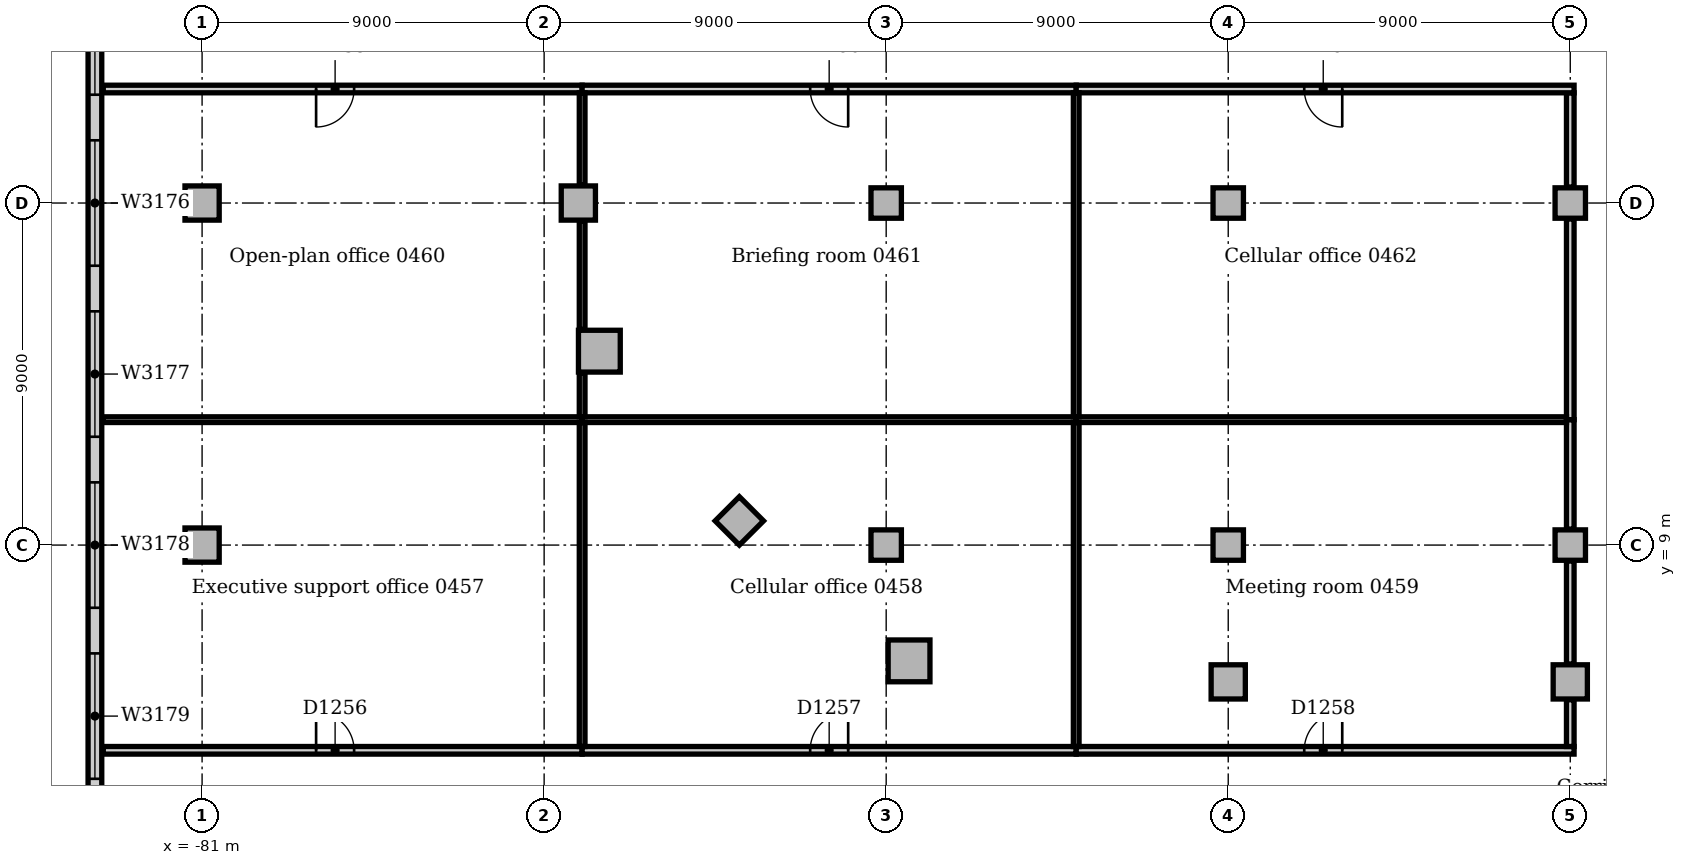
"""IFC4 building model, lengths in metres.
Left out: names, types, materials, properties, quantities, classifications, styles, units other than length and angle.
Written with IfcOpenShell. Run it as: python <this file> out.ifc"""

import sys

from ifc_helpers import new_model, si_unit, direction, frame, frame_2d, origin, origin_2d, place, context, subcontext, project, spatial, rectangle, extrude, element, fill, save


model = new_model("IFC4")
c1 = context("Model", 3, precision=1e-05, world=origin(), true_north=direction((0.0, 1.0)))
c2 = subcontext(c1, "Body", "Model", "MODEL_VIEW")
j1 = project(units=[si_unit("LENGTHUNIT", "METRE"), si_unit("PLANEANGLEUNIT", "RADIAN")], contexts=[c1])
p1 = place(None, origin())
s1 = spatial("IfcSite", under=j1, at=p1, CompositionType="ELEMENT")
p2 = place(p1, origin())
s2 = spatial("IfcBuilding", under=s1, at=p2, CompositionType="ELEMENT")
p3 = place(p2, frame((0.0, 0.0, 21.0)))
s3 = spatial("IfcBuildingStorey", under=s2, at=p3, CompositionType="ELEMENT", Elevation=21.0)
for number, where, z_axis, x_axis in (
    (1, (-62.398, 5.953, 0.0), (0.0, 0.0, 1.0), (1.0, 0.0, 0.0)),
    (2, (-70.547, 14.102, 0.0), (0.0, 0.0, 1.0), (1.0, 0.0, 0.0)),
):
    element("IfcColumn", number, at=place(p3, frame(where, z_axis=z_axis, x_axis=x_axis)), inside=s3, PredefinedType="COLUMN", context=c2, shape_type="SweptSolid", body=[
        extrude(rectangle(XDim=1.1, YDim=1.1, at=origin_2d()), origin(), (0.0, 0.0, 1.0), 4.85),
    ])
for number, where, z_axis, x_axis in (
    (3, (-54.0, 5.4, 0.0), (0.0, 0.0, 1.0), (1.0, 0.0, 0.0)),
    (4, (-45.0, 5.4, 0.0), (0.0, 0.0, 1.0), (1.0, 0.0, 0.0)),
    (5, (-71.1, 18.0, 0.0), (0.0, 0.0, 1.0), (1.0, 0.0, 0.0)),
    (6, (-66.864, 9.636, 0.0), (0.0, 0.0, 1.0), (0.707, 0.707, 0.0)),
):
    element("IfcColumn", number, at=place(p3, frame(where, z_axis=z_axis, x_axis=x_axis)), inside=s3, PredefinedType="COLUMN", context=c2, shape_type="SweptSolid", body=[
        extrude(rectangle(XDim=0.9, YDim=0.9, at=origin_2d()), origin(), (0.0, 0.0, 1.0), 4.85),
    ])
for number, where, z_axis, x_axis in (
    (7, (-63.0, 9.0, 0.0), (0.0, 0.0, 1.0), (1.0, 0.0, 0.0)),
    (8, (-63.0, 18.0, 0.0), (0.0, 0.0, 1.0), (1.0, 0.0, 0.0)),
    (9, (-54.0, 9.0, 0.0), (0.0, 0.0, 1.0), (1.0, 0.0, 0.0)),
    (10, (-54.0, 18.0, 0.0), (0.0, 0.0, 1.0), (1.0, 0.0, 0.0)),
    (11, (-45.0, 9.0, 0.0), (0.0, 0.0, 1.0), (1.0, 0.0, 0.0)),
    (12, (-45.0, 18.0, 0.0), (0.0, 0.0, 1.0), (1.0, 0.0, 0.0)),
):
    element("IfcColumn", number, at=place(p3, frame(where, z_axis=z_axis, x_axis=x_axis)), inside=s3, PredefinedType="COLUMN", context=c2, shape_type="SweptSolid", body=[
        extrude(rectangle(XDim=0.8, YDim=0.8, at=origin_2d()), origin(), (0.0, 0.0, 1.0), 4.85),
    ])
for number, where, z_axis, x_axis in (
    (13, (-81.0, 9.0, 0.0), (0.0, 0.0, 1.0), (1.0, 0.0, 0.0)),
    (14, (-81.0, 18.0, 0.0), (0.0, 0.0, 1.0), (1.0, 0.0, 0.0)),
):
    element("IfcColumn", number, at=place(p3, frame(where, z_axis=z_axis, x_axis=x_axis)), inside=s3, PredefinedType="COLUMN", context=c2, shape_type="SweptSolid", body=[
        extrude(rectangle(XDim=0.9, YDim=0.9, at=origin_2d()), origin(), (0.0, 0.0, 1.0), 4.7),
    ])
p4 = place(p3, frame((-83.82, 54.0, 0.0), z_axis=(0.0, 0.0, 1.0), x_axis=(0.0, -1.0, 0.0)))
e15 = element("IfcWall", 15, at=p4, inside=s3, PredefinedType="STANDARD", context=c2, shape_type="SweptSolid", body=[
    extrude(rectangle(XDim=63.0, YDim=0.36, at=frame_2d((31.5, 0.0))), origin(), (0.0, 0.0, 1.0), 4.85),
])
p5 = place(p4, frame((2.85, 0.0, 0.9)))
e16 = element("IfcOpeningElement", 16, at=p5, cuts=e15, PredefinedType="OPENING", context=c2, shape_type="SweptSolid", body=[
    extrude(rectangle(XDim=3.3, YDim=2.4, at=frame_2d((1.65, 1.2))), frame((0.0, 0.19, 0.0), z_axis=(0.0, -1.0, 0.0), x_axis=(1.0, 0.0, 0.0)), (0.0, 0.0, 1.0), 0.38),
])
p6 = place(p4, frame((7.35, 0.0, 0.9)))
e17 = element("IfcOpeningElement", 17, at=p6, cuts=e15, PredefinedType="OPENING", context=c2, shape_type="SweptSolid", body=[
    extrude(rectangle(XDim=3.3, YDim=2.4, at=frame_2d((1.65, 1.2))), frame((0.0, 0.19, 0.0), z_axis=(0.0, -1.0, 0.0), x_axis=(1.0, 0.0, 0.0)), (0.0, 0.0, 1.0), 0.38),
])
p7 = place(p4, frame((11.85, 0.0, 0.9)))
e18 = element("IfcOpeningElement", 18, at=p7, cuts=e15, PredefinedType="OPENING", context=c2, shape_type="SweptSolid", body=[
    extrude(rectangle(XDim=3.3, YDim=2.4, at=frame_2d((1.65, 1.2))), frame((0.0, 0.19, 0.0), z_axis=(0.0, -1.0, 0.0), x_axis=(1.0, 0.0, 0.0)), (0.0, 0.0, 1.0), 0.38),
])
p8 = place(p4, frame((16.35, 0.0, 0.9)))
e19 = element("IfcOpeningElement", 19, at=p8, cuts=e15, PredefinedType="OPENING", context=c2, shape_type="SweptSolid", body=[
    extrude(rectangle(XDim=3.3, YDim=2.4, at=frame_2d((1.65, 1.2))), frame((0.0, 0.19, 0.0), z_axis=(0.0, -1.0, 0.0), x_axis=(1.0, 0.0, 0.0)), (0.0, 0.0, 1.0), 0.38),
])
p9 = place(p4, frame((20.85, 0.0, 0.9)))
e20 = element("IfcOpeningElement", 20, at=p9, cuts=e15, PredefinedType="OPENING", context=c2, shape_type="SweptSolid", body=[
    extrude(rectangle(XDim=3.3, YDim=2.4, at=frame_2d((1.65, 1.2))), frame((0.0, 0.19, 0.0), z_axis=(0.0, -1.0, 0.0), x_axis=(1.0, 0.0, 0.0)), (0.0, 0.0, 1.0), 0.38),
])
p10 = place(p4, frame((25.35, 0.0, 0.9)))
e21 = element("IfcOpeningElement", 21, at=p10, cuts=e15, PredefinedType="OPENING", context=c2, shape_type="SweptSolid", body=[
    extrude(rectangle(XDim=3.3, YDim=2.4, at=frame_2d((1.65, 1.2))), frame((0.0, 0.19, 0.0), z_axis=(0.0, -1.0, 0.0), x_axis=(1.0, 0.0, 0.0)), (0.0, 0.0, 1.0), 0.38),
])
p11 = place(p4, frame((29.85, 0.0, 0.9)))
e22 = element("IfcOpeningElement", 22, at=p11, cuts=e15, PredefinedType="OPENING", context=c2, shape_type="SweptSolid", body=[
    extrude(rectangle(XDim=3.3, YDim=2.4, at=frame_2d((1.65, 1.2))), frame((0.0, 0.19, 0.0), z_axis=(0.0, -1.0, 0.0), x_axis=(1.0, 0.0, 0.0)), (0.0, 0.0, 1.0), 0.38),
])
p12 = place(p4, frame((34.35, 0.0, 0.9)))
e23 = element("IfcOpeningElement", 23, at=p12, cuts=e15, PredefinedType="OPENING", context=c2, shape_type="SweptSolid", body=[
    extrude(rectangle(XDim=3.3, YDim=2.4, at=frame_2d((1.65, 1.2))), frame((0.0, 0.19, 0.0), z_axis=(0.0, -1.0, 0.0), x_axis=(1.0, 0.0, 0.0)), (0.0, 0.0, 1.0), 0.38),
])
p13 = place(p4, frame((38.85, 0.0, 0.9)))
e24 = element("IfcOpeningElement", 24, at=p13, cuts=e15, PredefinedType="OPENING", context=c2, shape_type="SweptSolid", body=[
    extrude(rectangle(XDim=3.3, YDim=2.4, at=frame_2d((1.65, 1.2))), frame((0.0, 0.19, 0.0), z_axis=(0.0, -1.0, 0.0), x_axis=(1.0, 0.0, 0.0)), (0.0, 0.0, 1.0), 0.38),
])
p14 = place(p4, frame((43.35, 0.0, 0.9)))
e25 = element("IfcOpeningElement", 25, at=p14, cuts=e15, PredefinedType="OPENING", context=c2, shape_type="SweptSolid", body=[
    extrude(rectangle(XDim=3.3, YDim=2.4, at=frame_2d((1.65, 1.2))), frame((0.0, 0.19, 0.0), z_axis=(0.0, -1.0, 0.0), x_axis=(1.0, 0.0, 0.0)), (0.0, 0.0, 1.0), 0.38),
])
p15 = place(p4, frame((47.85, 0.0, 0.9)))
e26 = element("IfcOpeningElement", 26, at=p15, cuts=e15, PredefinedType="OPENING", context=c2, shape_type="SweptSolid", body=[
    extrude(rectangle(XDim=3.3, YDim=2.4, at=frame_2d((1.65, 1.2))), frame((0.0, 0.19, 0.0), z_axis=(0.0, -1.0, 0.0), x_axis=(1.0, 0.0, 0.0)), (0.0, 0.0, 1.0), 0.38),
])
p16 = place(p4, frame((52.35, 0.0, 0.9)))
e27 = element("IfcOpeningElement", 27, at=p16, cuts=e15, PredefinedType="OPENING", context=c2, shape_type="SweptSolid", body=[
    extrude(rectangle(XDim=3.3, YDim=2.4, at=frame_2d((1.65, 1.2))), frame((0.0, 0.19, 0.0), z_axis=(0.0, -1.0, 0.0), x_axis=(1.0, 0.0, 0.0)), (0.0, 0.0, 1.0), 0.38),
])
p17 = place(p4, frame((56.85, 0.0, 0.9)))
e28 = element("IfcOpeningElement", 28, at=p17, cuts=e15, PredefinedType="OPENING", context=c2, shape_type="SweptSolid", body=[
    extrude(rectangle(XDim=3.3, YDim=2.4, at=frame_2d((1.65, 1.2))), frame((0.0, 0.19, 0.0), z_axis=(0.0, -1.0, 0.0), x_axis=(1.0, 0.0, 0.0)), (0.0, 0.0, 1.0), 0.38),
])
p18 = place(p3, frame((-83.6, 3.6, 0.0), z_axis=(0.0, 0.0, 1.0), x_axis=(1.0, 0.0, 0.0)))
e29 = element("IfcWall", 29, at=p18, inside=s3, PredefinedType="PARTITIONING", context=c2, shape_type="SweptSolid", body=[
    extrude(rectangle(XDim=12.6, YDim=0.2, at=frame_2d((6.3, 0.0))), origin(), (0.0, 0.0, 1.0), 4.7),
])
p19 = place(p18, frame((5.6, 0.0, 0.0)))
e30 = element("IfcOpeningElement", 30, at=p19, cuts=e29, PredefinedType="OPENING", context=c2, shape_type="SweptSolid", body=[
    extrude(rectangle(XDim=1.0, YDim=2.1, at=frame_2d((0.5, 1.05))), frame((0.0, 0.11, 0.0), z_axis=(0.0, -1.0, 0.0), x_axis=(1.0, 0.0, 0.0)), (0.0, 0.0, 1.0), 0.22),
])
p20 = place(p3, frame((-71.0, 3.6, 0.0), z_axis=(0.0, 0.0, 1.0), x_axis=(1.0, 0.0, 0.0)))
e31 = element("IfcWall", 31, at=p20, inside=s3, PredefinedType="PARTITIONING", context=c2, shape_type="SweptSolid", body=[
    extrude(rectangle(XDim=13.0, YDim=0.2, at=frame_2d((6.5, 0.0))), origin(), (0.0, 0.0, 1.0), 4.7),
])
p21 = place(p20, frame((6.0, 0.0, 0.0)))
e32 = element("IfcOpeningElement", 32, at=p21, cuts=e31, PredefinedType="OPENING", context=c2, shape_type="SweptSolid", body=[
    extrude(rectangle(XDim=1.0, YDim=2.1, at=frame_2d((0.5, 1.05))), frame((0.0, 0.11, 0.0), z_axis=(0.0, -1.0, 0.0), x_axis=(1.0, 0.0, 0.0)), (0.0, 0.0, 1.0), 0.22),
])
p22 = place(p3, frame((-58.0, 3.6, 0.0), z_axis=(0.0, 0.0, 1.0), x_axis=(1.0, 0.0, 0.0)))
e33 = element("IfcWall", 33, at=p22, inside=s3, PredefinedType="PARTITIONING", context=c2, shape_type="SweptSolid", body=[
    extrude(rectangle(XDim=13.1, YDim=0.2, at=frame_2d((6.55, 0.0))), origin(), (0.0, 0.0, 1.0), 4.7),
])
p23 = place(p22, frame((6.0, 0.0, 0.0)))
e34 = element("IfcOpeningElement", 34, at=p23, cuts=e33, PredefinedType="OPENING", context=c2, shape_type="SweptSolid", body=[
    extrude(rectangle(XDim=1.0, YDim=2.1, at=frame_2d((0.5, 1.05))), frame((0.0, 0.11, 0.0), z_axis=(0.0, -1.0, 0.0), x_axis=(1.0, 0.0, 0.0)), (0.0, 0.0, 1.0), 0.22),
])
p24 = place(p3, frame((-45.0, 3.7, 0.0), z_axis=(0.0, 0.0, 1.0), x_axis=(0.0, 1.0, 0.0)))
e35 = element("IfcWall", 35, at=p24, inside=s3, PredefinedType="PARTITIONING", context=c2, shape_type="SweptSolid", body=[
    extrude(rectangle(XDim=1.23, YDim=0.2, at=frame_2d((0.615, 0.0))), origin(), (0.0, 0.0, 1.0), 4.7),
])
p25 = place(p3, frame((-45.0, 5.87, 0.0), z_axis=(0.0, 0.0, 1.0), x_axis=(0.0, 1.0, 0.0)))
e36 = element("IfcWall", 36, at=p25, inside=s3, PredefinedType="PARTITIONING", context=c2, shape_type="SweptSolid", body=[
    extrude(rectangle(XDim=2.71, YDim=0.2, at=frame_2d((1.355, 0.0))), origin(), (0.0, 0.0, 1.0), 4.85),
])
p26 = place(p3, frame((-45.0, 9.42, 0.0), z_axis=(0.0, 0.0, 1.0), x_axis=(0.0, 1.0, 0.0)))
e37 = element("IfcWall", 37, at=p26, inside=s3, PredefinedType="PARTITIONING", context=c2, shape_type="SweptSolid", body=[
    extrude(rectangle(XDim=2.88, YDim=0.2, at=frame_2d((1.44, 0.0))), origin(), (0.0, 0.0, 1.0), 4.158),
])
p27 = place(p3, frame((-45.0, 12.3, 0.0), z_axis=(0.0, 0.0, 1.0), x_axis=(0.0, 1.0, 0.0)))
e38 = element("IfcWall", 38, at=p27, inside=s3, PredefinedType="PARTITIONING", context=c2, shape_type="SweptSolid", body=[
    extrude(rectangle(XDim=5.28, YDim=0.2, at=frame_2d((2.64, 0.0))), origin(), (0.0, 0.0, 1.0), 4.158),
])
p28 = place(p3, frame((-45.0, 18.42, 0.0), z_axis=(0.0, 0.0, 1.0), x_axis=(0.0, 1.0, 0.0)))
e39 = element("IfcWall", 39, at=p28, inside=s3, PredefinedType="PARTITIONING", context=c2, shape_type="SweptSolid", body=[
    extrude(rectangle(XDim=2.48, YDim=0.2, at=frame_2d((1.24, 0.0))), origin(), (0.0, 0.0, 1.0), 4.158),
])
p29 = place(p3, frame((-83.6, 21.0, 0.0), z_axis=(0.0, 0.0, 1.0), x_axis=(1.0, 0.0, 0.0)))
e40 = element("IfcWall", 40, at=p29, inside=s3, PredefinedType="PARTITIONING", context=c2, shape_type="SweptSolid", body=[
    extrude(rectangle(XDim=12.6, YDim=0.2, at=frame_2d((6.3, 0.0))), origin(), (0.0, 0.0, 1.0), 4.7),
])
p30 = place(p29, frame((5.6, 0.0, 0.0)))
e41 = element("IfcOpeningElement", 41, at=p30, cuts=e40, PredefinedType="OPENING", context=c2, shape_type="SweptSolid", body=[
    extrude(rectangle(XDim=1.0, YDim=2.1, at=frame_2d((0.5, 1.05))), frame((0.0, 0.11, 0.0), z_axis=(0.0, -1.0, 0.0), x_axis=(1.0, 0.0, 0.0)), (0.0, 0.0, 1.0), 0.22),
])
p31 = place(p3, frame((-71.0, 21.0, 0.0), z_axis=(0.0, 0.0, 1.0), x_axis=(1.0, 0.0, 0.0)))
e42 = element("IfcWall", 42, at=p31, inside=s3, PredefinedType="PARTITIONING", context=c2, shape_type="SweptSolid", body=[
    extrude(rectangle(XDim=13.0, YDim=0.2, at=frame_2d((6.5, 0.0))), origin(), (0.0, 0.0, 1.0), 4.85),
])
p32 = place(p31, frame((6.0, 0.0, 0.0)))
e43 = element("IfcOpeningElement", 43, at=p32, cuts=e42, PredefinedType="OPENING", context=c2, shape_type="SweptSolid", body=[
    extrude(rectangle(XDim=1.0, YDim=2.1, at=frame_2d((0.5, 1.05))), frame((0.0, 0.11, 0.0), z_axis=(0.0, -1.0, 0.0), x_axis=(1.0, 0.0, 0.0)), (0.0, 0.0, 1.0), 0.22),
])
p33 = place(p3, frame((-58.0, 21.0, 0.0), z_axis=(0.0, 0.0, 1.0), x_axis=(1.0, 0.0, 0.0)))
e44 = element("IfcWall", 44, at=p33, inside=s3, PredefinedType="PARTITIONING", context=c2, shape_type="SweptSolid", body=[
    extrude(rectangle(XDim=13.1, YDim=0.2, at=frame_2d((6.55, 0.0))), origin(), (0.0, 0.0, 1.0), 4.85),
])
p34 = place(p33, frame((6.0, 0.0, 0.0)))
e45 = element("IfcOpeningElement", 45, at=p34, cuts=e44, PredefinedType="OPENING", context=c2, shape_type="SweptSolid", body=[
    extrude(rectangle(XDim=1.0, YDim=2.1, at=frame_2d((0.5, 1.05))), frame((0.0, 0.11, 0.0), z_axis=(0.0, -1.0, 0.0), x_axis=(1.0, 0.0, 0.0)), (0.0, 0.0, 1.0), 0.22),
])
p35 = place(p3, frame((-71.0, 3.7, 0.0), z_axis=(0.0, 0.0, 1.0), x_axis=(0.0, 1.0, 0.0)))
e46 = element("IfcWall", 46, at=p35, inside=s3, PredefinedType="PARTITIONING", context=c2, shape_type="SweptSolid", body=[
    extrude(rectangle(XDim=8.525, YDim=0.15, at=frame_2d((4.263, 0.0))), origin(), (0.0, 0.0, 1.0), 4.7),
])
p36 = place(p3, frame((-83.6, 12.3, 0.0), z_axis=(0.0, 0.0, 1.0), x_axis=(1.0, 0.0, 0.0)))
e47 = element("IfcWall", 47, at=p36, inside=s3, PredefinedType="PARTITIONING", context=c2, shape_type="SweptSolid", body=[
    extrude(rectangle(XDim=12.6, YDim=0.15, at=frame_2d((6.3, 0.0))), origin(), (0.0, 0.0, 1.0), 4.7),
])
p37 = place(p3, frame((-58.0, 3.7, 0.0), z_axis=(0.0, 0.0, 1.0), x_axis=(0.0, 1.0, 0.0)))
e48 = element("IfcWall", 48, at=p37, inside=s3, PredefinedType="PARTITIONING", context=c2, shape_type="SweptSolid", body=[
    extrude(rectangle(XDim=8.525, YDim=0.15, at=frame_2d((4.263, 0.0))), origin(), (0.0, 0.0, 1.0), 4.7),
])
p38 = place(p3, frame((-71.0, 12.3, 0.0), z_axis=(0.0, 0.0, 1.0), x_axis=(1.0, 0.0, 0.0)))
e49 = element("IfcWall", 49, at=p38, inside=s3, PredefinedType="PARTITIONING", context=c2, shape_type="SweptSolid", body=[
    extrude(rectangle(XDim=13.0, YDim=0.15, at=frame_2d((6.5, 0.0))), origin(), (0.0, 0.0, 1.0), 4.7),
])
p39 = place(p3, frame((-58.0, 12.3, 0.0), z_axis=(0.0, 0.0, 1.0), x_axis=(1.0, 0.0, 0.0)))
e50 = element("IfcWall", 50, at=p39, inside=s3, PredefinedType="PARTITIONING", context=c2, shape_type="SweptSolid", body=[
    extrude(rectangle(XDim=12.9, YDim=0.15, at=frame_2d((6.45, 0.0))), origin(), (0.0, 0.0, 1.0), 4.85),
])
p40 = place(p3, frame((-71.0, 12.375, 0.0), z_axis=(0.0, 0.0, 1.0), x_axis=(0.0, 1.0, 0.0)))
e51 = element("IfcWall", 51, at=p40, inside=s3, PredefinedType="PARTITIONING", context=c2, shape_type="SweptSolid", body=[
    extrude(rectangle(XDim=1.157, YDim=0.15, at=frame_2d((0.579, 0.0))), origin(), (0.0, 0.0, 1.0), 4.85),
])
p41 = place(p3, frame((-71.0, 14.672, 0.0), z_axis=(0.0, 0.0, 1.0), x_axis=(0.0, 1.0, 0.0)))
e52 = element("IfcWall", 52, at=p41, inside=s3, PredefinedType="PARTITIONING", context=c2, shape_type="SweptSolid", body=[
    extrude(rectangle(XDim=2.858, YDim=0.15, at=frame_2d((1.429, 0.0))), origin(), (0.0, 0.0, 1.0), 4.25),
])
p42 = place(p3, frame((-71.0, 18.47, 0.0), z_axis=(0.0, 0.0, 1.0), x_axis=(0.0, 1.0, 0.0)))
e53 = element("IfcWall", 53, at=p42, inside=s3, PredefinedType="PARTITIONING", context=c2, shape_type="SweptSolid", body=[
    extrude(rectangle(XDim=2.43, YDim=0.15, at=frame_2d((1.215, 0.0))), origin(), (0.0, 0.0, 1.0), 4.25),
])
p43 = place(p3, frame((-58.0, 12.375, 0.0), z_axis=(0.0, 0.0, 1.0), x_axis=(0.0, 1.0, 0.0)))
e54 = element("IfcWall", 54, at=p43, inside=s3, PredefinedType="PARTITIONING", context=c2, shape_type="SweptSolid", body=[
    extrude(rectangle(XDim=8.525, YDim=0.15, at=frame_2d((4.263, 0.0))), origin(), (0.0, 0.0, 1.0), 4.85),
])
p44 = place(p11, origin())
e55 = element("IfcWindow", 55, at=p44, inside=s3, PartitioningType="SINGLE_PANEL", PredefinedType="WINDOW", context=c2, shape_type="SweptSolid", body=[
    extrude(rectangle(XDim=3.3, YDim=2.4, at=frame_2d((1.65, 1.2))), frame((0.0, 0.13, 0.0), z_axis=(0.0, -1.0, 0.0), x_axis=(1.0, 0.0, 0.0)), (0.0, 0.0, 1.0), 0.06),
])
fill(e22, e55)
p45 = place(p12, origin())
e56 = element("IfcWindow", 56, at=p45, inside=s3, PartitioningType="SINGLE_PANEL", PredefinedType="WINDOW", context=c2, shape_type="SweptSolid", body=[
    extrude(rectangle(XDim=3.3, YDim=2.4, at=frame_2d((1.65, 1.2))), frame((0.0, 0.13, 0.0), z_axis=(0.0, -1.0, 0.0), x_axis=(1.0, 0.0, 0.0)), (0.0, 0.0, 1.0), 0.06),
])
fill(e23, e56)
p46 = place(p13, origin())
e57 = element("IfcWindow", 57, at=p46, inside=s3, PartitioningType="SINGLE_PANEL", PredefinedType="WINDOW", context=c2, shape_type="SweptSolid", body=[
    extrude(rectangle(XDim=3.3, YDim=2.4, at=frame_2d((1.65, 1.2))), frame((0.0, 0.13, 0.0), z_axis=(0.0, -1.0, 0.0), x_axis=(1.0, 0.0, 0.0)), (0.0, 0.0, 1.0), 0.06),
])
fill(e24, e57)
p47 = place(p14, origin())
e58 = element("IfcWindow", 58, at=p47, inside=s3, PartitioningType="SINGLE_PANEL", PredefinedType="WINDOW", context=c2, shape_type="SweptSolid", body=[
    extrude(rectangle(XDim=3.3, YDim=2.4, at=frame_2d((1.65, 1.2))), frame((0.0, 0.13, 0.0), z_axis=(0.0, -1.0, 0.0), x_axis=(1.0, 0.0, 0.0)), (0.0, 0.0, 1.0), 0.06),
])
fill(e25, e58)
p48 = place(p15, origin())
e59 = element("IfcWindow", 59, at=p48, inside=s3, PartitioningType="SINGLE_PANEL", PredefinedType="WINDOW", context=c2, shape_type="SweptSolid", body=[
    extrude(rectangle(XDim=3.3, YDim=2.4, at=frame_2d((1.65, 1.2))), frame((0.0, 0.13, 0.0), z_axis=(0.0, -1.0, 0.0), x_axis=(1.0, 0.0, 0.0)), (0.0, 0.0, 1.0), 0.06),
])
fill(e26, e59)
p49 = place(p19, origin())
e60 = element("IfcDoor", 60, at=p49, inside=s3, OperationType="SINGLE_SWING_LEFT", PredefinedType="DOOR", context=c2, shape_type="SweptSolid", body=[
    extrude(rectangle(XDim=1.0, YDim=2.1, at=frame_2d((0.5, 1.05))), frame((0.0, 0.025, 0.0), z_axis=(0.0, -1.0, 0.0), x_axis=(1.0, 0.0, 0.0)), (0.0, 0.0, 1.0), 0.05),
])
fill(e30, e60)
p50 = place(p21, origin())
e61 = element("IfcDoor", 61, at=p50, inside=s3, OperationType="SINGLE_SWING_RIGHT", PredefinedType="DOOR", context=c2, shape_type="SweptSolid", body=[
    extrude(rectangle(XDim=1.0, YDim=2.1, at=frame_2d((0.5, 1.05))), frame((0.0, 0.025, 0.0), z_axis=(0.0, -1.0, 0.0), x_axis=(1.0, 0.0, 0.0)), (0.0, 0.0, 1.0), 0.05),
])
fill(e32, e61)
p51 = place(p23, origin())
e62 = element("IfcDoor", 62, at=p51, inside=s3, OperationType="SINGLE_SWING_RIGHT", PredefinedType="DOOR", context=c2, shape_type="SweptSolid", body=[
    extrude(rectangle(XDim=1.0, YDim=2.1, at=frame_2d((0.5, 1.05))), frame((0.0, 0.025, 0.0), z_axis=(0.0, -1.0, 0.0), x_axis=(1.0, 0.0, 0.0)), (0.0, 0.0, 1.0), 0.05),
])
fill(e34, e62)
p52 = place(p30, frame((1.0, 0.0, 0.0), z_axis=(0.0, 0.0, 1.0), x_axis=(-1.0, 0.0, 0.0)))
e63 = element("IfcDoor", 63, at=p52, inside=s3, OperationType="SINGLE_SWING_RIGHT", PredefinedType="DOOR", context=c2, shape_type="SweptSolid", body=[
    extrude(rectangle(XDim=1.0, YDim=2.1, at=frame_2d((0.5, 1.05))), frame((0.0, 0.025, 0.0), z_axis=(0.0, -1.0, 0.0), x_axis=(1.0, 0.0, 0.0)), (0.0, 0.0, 1.0), 0.05),
])
fill(e41, e63)
p53 = place(p32, frame((1.0, 0.0, 0.0), z_axis=(0.0, 0.0, 1.0), x_axis=(-1.0, 0.0, 0.0)))
e64 = element("IfcDoor", 64, at=p53, inside=s3, OperationType="SINGLE_SWING_LEFT", PredefinedType="DOOR", context=c2, shape_type="SweptSolid", body=[
    extrude(rectangle(XDim=1.0, YDim=2.1, at=frame_2d((0.5, 1.05))), frame((0.0, 0.025, 0.0), z_axis=(0.0, -1.0, 0.0), x_axis=(1.0, 0.0, 0.0)), (0.0, 0.0, 1.0), 0.05),
])
fill(e43, e64)
p54 = place(p34, frame((1.0, 0.0, 0.0), z_axis=(0.0, 0.0, 1.0), x_axis=(-1.0, 0.0, 0.0)))
e65 = element("IfcDoor", 65, at=p54, inside=s3, OperationType="SINGLE_SWING_LEFT", PredefinedType="DOOR", context=c2, shape_type="SweptSolid", body=[
    extrude(rectangle(XDim=1.0, YDim=2.1, at=frame_2d((0.5, 1.05))), frame((0.0, 0.025, 0.0), z_axis=(0.0, -1.0, 0.0), x_axis=(1.0, 0.0, 0.0)), (0.0, 0.0, 1.0), 0.05),
])
fill(e45, e65)
save(model, sys.argv[1])
